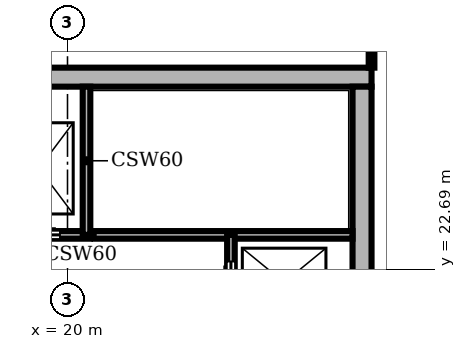
"""IFC4 building model, lengths in metres.
Left out: names, types, materials, properties, quantities, classifications, styles, units other than length and angle.
Written with IfcOpenShell. Run it as: python <this file> out.ifc"""

import sys

from ifc_helpers import new_model, si_unit, direction, frame, frame_2d, origin, place, context, subcontext, project, spatial, rectangle, extrude, element, fill, save


model = new_model("IFC4")
c1 = context("Model", 3, precision=1e-05, world=origin(), true_north=direction((0.0, 1.0)))
c2 = subcontext(c1, "Body", "Model", "MODEL_VIEW")
j1 = project(units=[si_unit("LENGTHUNIT", "METRE"), si_unit("PLANEANGLEUNIT", "RADIAN")], contexts=[c1])
p1 = place(None, origin())
s1 = spatial("IfcSite", under=j1, at=p1, CompositionType="ELEMENT")
p2 = place(p1, origin())
s2 = spatial("IfcBuilding", under=s1, at=p2, CompositionType="ELEMENT")
p3 = place(p2, frame((0.0, 0.0, 341.1)))
s3 = spatial("IfcBuildingStorey", under=s2, at=p3, CompositionType="ELEMENT", Elevation=341.1)
p4 = place(p3, frame((27.75, 8.5, 0.0), z_axis=(0.0, 0.0, 1.0), x_axis=(0.0, 1.0, 0.0)))
e1 = element("IfcWall", 1, at=p4, inside=s3, PredefinedType="SHEAR", context=c2, shape_type="SweptSolid", body=[
    extrude(rectangle(XDim=19.0, YDim=0.5, at=frame_2d((9.5, 0.0))), origin(), (0.0, 0.0, 1.0), 3.9),
])
p5 = place(p4, frame((4.95, 0.0, 0.0)))
e2 = element("IfcOpeningElement", 2, at=p5, cuts=e1, PredefinedType="OPENING", context=c2, shape_type="SweptSolid", body=[
    extrude(rectangle(XDim=1.6, YDim=2.1, at=frame_2d((0.8, 1.05))), frame((0.0, 0.26, 0.0), z_axis=(0.0, -1.0, 0.0), x_axis=(1.0, 0.0, 0.0)), (0.0, 0.0, 1.0), 0.52),
])
p6 = place(p3, frame((28.0, 27.75, 0.0), z_axis=(0.0, 0.0, 1.0), x_axis=(-1.0, 0.0, 0.0)))
e3 = element("IfcWall", 3, at=p6, inside=s3, PredefinedType="SHEAR", context=c2, shape_type="SweptSolid", body=[
    extrude(rectangle(XDim=20.0, YDim=0.5, at=frame_2d((10.0, 0.0))), origin(), (0.0, 0.0, 1.0), 3.9),
])
p7 = place(p3, frame((13.8, 23.6, 0.0), z_axis=(0.0, 0.0, 1.0), x_axis=(1.0, 0.0, 0.0)))
e4 = element("IfcWall", 4, at=p7, inside=s3, PredefinedType="SHEAR", context=c2, shape_type="SweptSolid", body=[
    extrude(rectangle(XDim=13.7, YDim=0.2, at=frame_2d((6.85, 0.0))), origin(), (0.0, 0.0, 1.0), 3.58),
])
p8 = place(p7, frame((2.4, 0.0, 0.0)))
e5 = element("IfcOpeningElement", 5, at=p8, cuts=e4, PredefinedType="OPENING", context=c2, shape_type="SweptSolid", body=[
    extrude(rectangle(XDim=1.1, YDim=2.1, at=frame_2d((0.55, 1.05))), frame((0.0, 0.11, 0.0), z_axis=(0.0, -1.0, 0.0), x_axis=(1.0, 0.0, 0.0)), (0.0, 0.0, 1.0), 0.22),
])
p9 = place(p7, frame((4.9, 0.0, 0.0)))
e6 = element("IfcOpeningElement", 6, at=p9, cuts=e4, PredefinedType="OPENING", context=c2, shape_type="SweptSolid", body=[
    extrude(rectangle(XDim=1.1, YDim=2.1, at=frame_2d((0.55, 1.05))), frame((0.0, 0.11, 0.0), z_axis=(0.0, -1.0, 0.0), x_axis=(1.0, 0.0, 0.0)), (0.0, 0.0, 1.0), 0.22),
])
p10 = place(p7, frame((0.15, 0.0, 0.0)))
e7 = element("IfcOpeningElement", 7, at=p10, cuts=e4, PredefinedType="OPENING", context=c2, shape_type="SweptSolid", body=[
    extrude(rectangle(XDim=1.0, YDim=2.1, at=frame_2d((0.5, 1.05))), frame((0.0, 0.11, 0.0), z_axis=(0.0, -1.0, 0.0), x_axis=(1.0, 0.0, 0.0)), (0.0, 0.0, 1.0), 0.22),
])
p11 = place(p3, frame((20.5, 23.6, 0.0), z_axis=(0.0, 0.0, 1.0), x_axis=(0.0, 1.0, 0.0)))
e8 = element("IfcWall", 8, at=p11, inside=s3, PredefinedType="SHEAR", context=c2, shape_type="SweptSolid", body=[
    extrude(rectangle(XDim=3.9, YDim=0.2, at=frame_2d((1.95, 0.0))), origin(), (0.0, 0.0, 1.0), 3.58),
])
p12 = place(p3, frame((24.3, 16.1, 0.0), z_axis=(0.0, 0.0, 1.0), x_axis=(0.0, 1.0, 0.0)))
e9 = element("IfcWall", 9, at=p12, inside=s3, PredefinedType="SHEAR", context=c2, shape_type="SweptSolid", body=[
    extrude(rectangle(XDim=7.5, YDim=0.2, at=frame_2d((3.75, 0.0))), origin(), (0.0, 0.0, 1.0), 3.58),
])
p13 = place(p12, frame((5.7, 0.0, 0.0)))
e10 = element("IfcOpeningElement", 10, at=p13, cuts=e9, PredefinedType="OPENING", context=c2, shape_type="SweptSolid", body=[
    extrude(rectangle(XDim=1.1, YDim=2.1, at=frame_2d((0.55, 1.05))), frame((0.0, 0.11, 0.0), z_axis=(0.0, -1.0, 0.0), x_axis=(1.0, 0.0, 0.0)), (0.0, 0.0, 1.0), 0.22),
])
p14 = place(p3, frame((28.0, 28.0, 0.0), z_axis=(0.0, 0.0, 1.0), x_axis=(0.0, 1.0, 0.0)))
e11 = element("IfcWall", 11, at=p14, inside=s3, PredefinedType="PARTITIONING", context=c2, shape_type="SweptSolid", body=[
    extrude(rectangle(XDim=2.598, YDim=0.15, at=frame_2d((1.299, 0.0))), origin(), (0.0, 0.0, 1.0), 3.58),
])
p15 = place(p13, origin())
e12 = element("IfcDoor", 12, at=p15, inside=s3, OperationType="DOUBLE_DOOR_SLIDING", PredefinedType="DOOR", context=c2, shape_type="SweptSolid", body=[
    extrude(rectangle(XDim=1.1, YDim=2.1, at=frame_2d((0.55, 1.05))), frame((0.0, 0.025, 0.0), z_axis=(0.0, -1.0, 0.0), x_axis=(1.0, 0.0, 0.0)), (0.0, 0.0, 1.0), 0.05),
])
fill(e10, e12)
p16 = place(p9, origin())
e13 = element("IfcDoor", 13, at=p16, inside=s3, OperationType="DOUBLE_DOOR_SLIDING", PredefinedType="DOOR", context=c2, shape_type="SweptSolid", body=[
    extrude(rectangle(XDim=1.1, YDim=2.1, at=frame_2d((0.55, 1.05))), frame((0.0, 0.025, 0.0), z_axis=(0.0, -1.0, 0.0), x_axis=(1.0, 0.0, 0.0)), (0.0, 0.0, 1.0), 0.05),
])
fill(e6, e13)
save(model, sys.argv[1])
